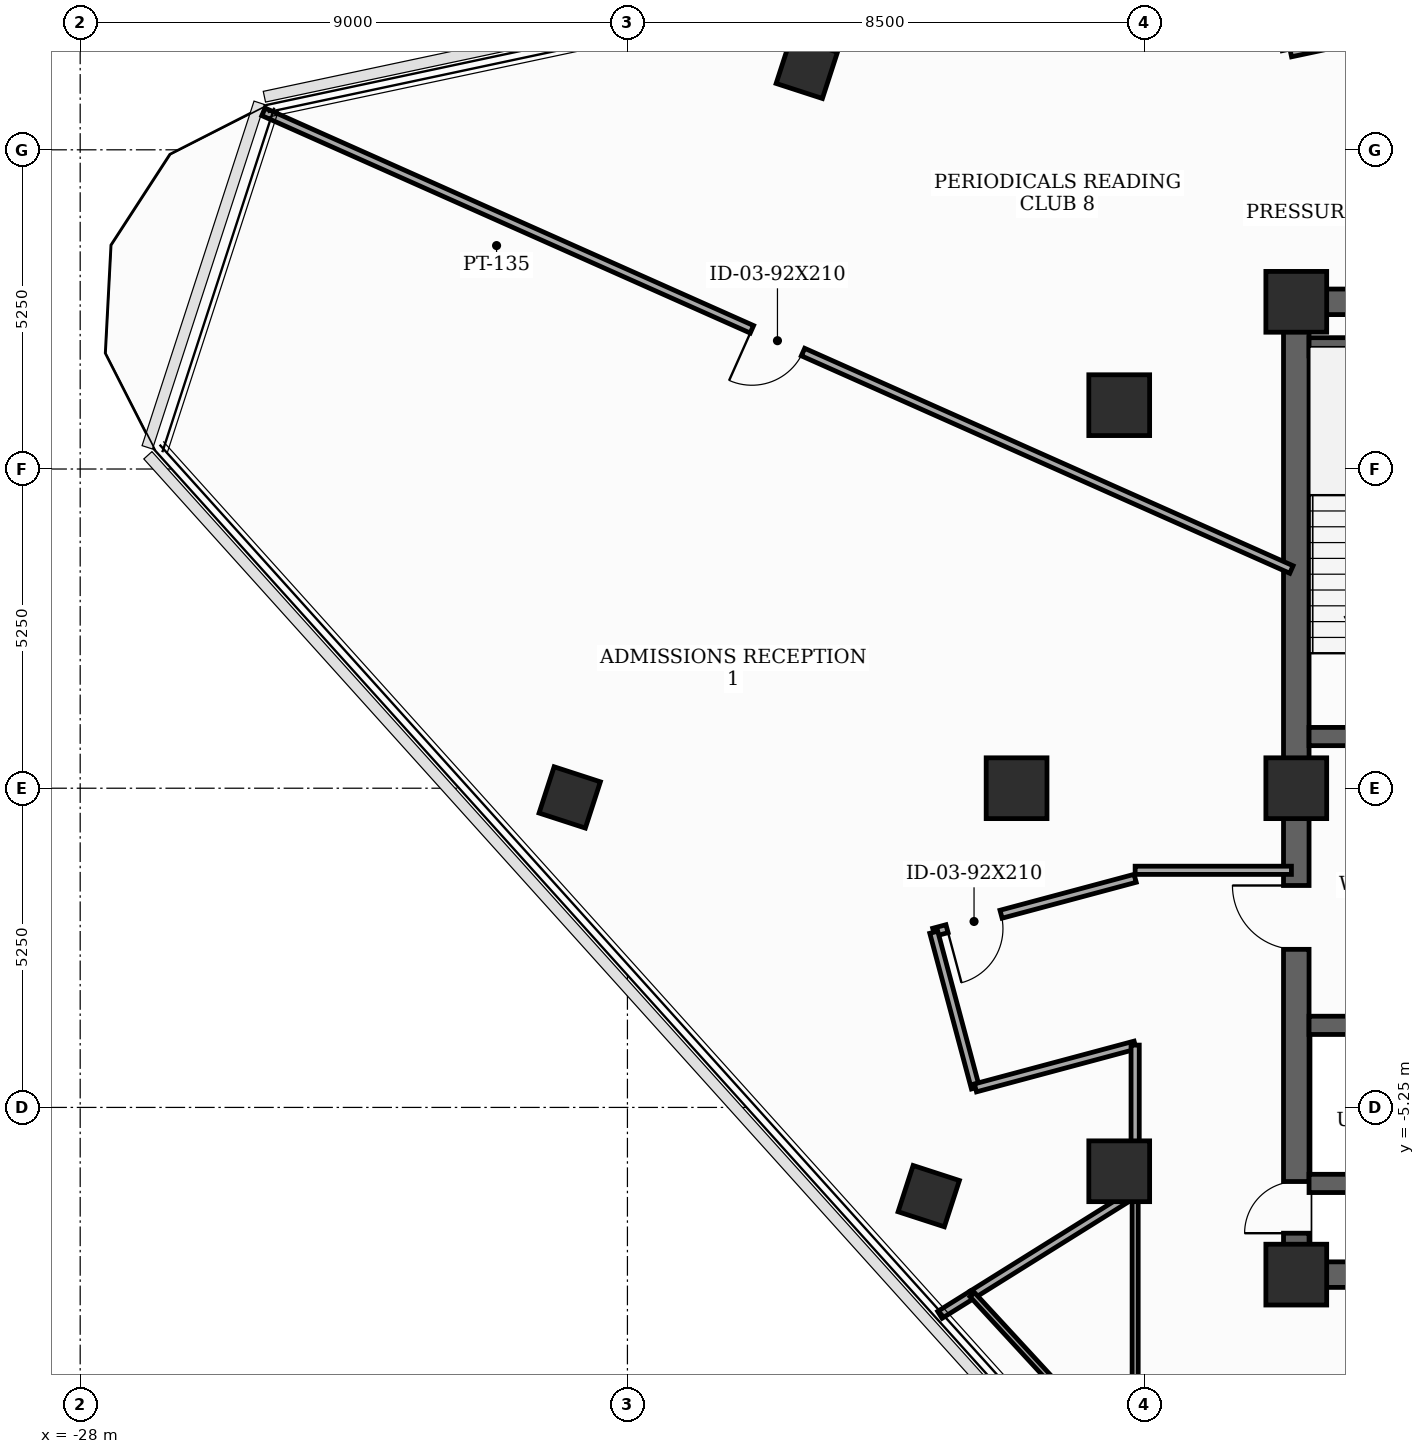
"""IFC4 building model, lengths in metres.
Left out: names, types, materials, properties, quantities, classifications, styles, units other than length and angle.
Written with IfcOpenShell. Run it as: python <this file> out.ifc"""

import sys

from ifc_helpers import new_model, si_unit, direction, frame, frame_2d, origin, origin_2d, place, context, subcontext, project, spatial, rectangle, extrude, element, fill, save


model = new_model("IFC4")
c1 = context("Model", 3, precision=1e-05, world=origin(), true_north=direction((0.0, 1.0)))
c2 = subcontext(c1, "Body", "Model", "MODEL_VIEW")
j1 = project(units=[si_unit("LENGTHUNIT", "METRE"), si_unit("PLANEANGLEUNIT", "RADIAN")], contexts=[c1])
p1 = place(None, origin())
s1 = spatial("IfcSite", under=j1, at=p1, CompositionType="ELEMENT")
p2 = place(p1, origin())
s2 = spatial("IfcBuilding", under=s1, at=p2, CompositionType="ELEMENT")
p3 = place(p2, frame((0.0, 0.0, 290.6)))
s3 = spatial("IfcBuildingStorey", under=s2, at=p3, CompositionType="ELEMENT", Elevation=290.6)
for number, where, z_axis, x_axis in (
    (1, (-8.0, -8.0, 0.0), (0.0, 0.0, 1.0), (1.0, 0.0, 0.0)),
    (2, (-8.0, 8.0, 0.0), (0.0, 0.0, 1.0), (1.0, 0.0, 0.0)),
    (3, (-8.0, 0.0, 0.0), (0.0, 0.0, 1.0), (1.0, 0.0, 0.0)),
    (4, (-10.912, 6.3, 0.0), (0.0, 0.0, 1.0), (1.0, 0.0, 0.0)),
    (5, (-12.6, 0.0, 0.0), (0.0, 0.0, 1.0), (1.0, 0.0, 0.0)),
    (6, (-10.912, -6.3, 0.0), (0.0, 0.0, 1.0), (1.0, 0.0, 0.0)),
):
    element("IfcColumn", number, at=place(p3, frame(where, z_axis=z_axis, x_axis=x_axis)), inside=s3, PredefinedType="COLUMN", context=c2, shape_type="SweptSolid", body=[
        extrude(rectangle(XDim=1.0, YDim=1.0, at=origin_2d()), origin(), (0.0, 0.0, 1.0), 3.7),
    ])
for number, where, z_axis, x_axis in (
    (7, (-16.05, 11.848, 0.0), (0.0, 0.0, 1.0), (0.309, 0.951, 0.0)),
    (8, (-19.949, -0.151, 0.0), (0.0, 0.0, 1.0), (0.309, 0.951, 0.0)),
    (9, (-14.045, -6.709, 0.0), (0.0, 0.0, 1.0), (0.309, 0.951, 0.0)),
):
    element("IfcColumn", number, at=place(p3, frame(where, z_axis=z_axis, x_axis=x_axis)), inside=s3, PredefinedType="COLUMN", context=c2, shape_type="SweptSolid", body=[
        extrude(rectangle(XDim=0.8, YDim=0.8, at=origin_2d()), origin(), (0.0, 0.0, 1.0), 3.7),
    ])
p4 = place(p3, frame((2.459, 14.402, 0.0), z_axis=(0.0, 0.0, 1.0), x_axis=(-0.978149082982, -0.207904717268, 0.0)))
e10 = element("IfcWall", 10, at=p4, inside=s3, PredefinedType="SOLIDWALL", context=c2, shape_type="SweptSolid", body=[
    extrude(rectangle(XDim=10.8, YDim=0.26, at=frame_2d((5.4, 0.0))), origin(), (0.0, 0.0, 1.0), 3.5),
])
p5 = place(p4, frame((4.6, 0.0, 0.0)))
e11 = element("IfcOpeningElement", 11, at=p5, cuts=e10, PredefinedType="OPENING", context=c2, shape_type="SweptSolid", body=[
    extrude(rectangle(XDim=1.05, YDim=2.08, at=frame_2d((0.525, 1.04))), frame((0.0, 0.14, 0.0), z_axis=(0.0, -1.0, 0.0), x_axis=(1.0, 0.0, 0.0)), (0.0, 0.0, 1.0), 0.28),
])
p6 = place(p4, frame((6.45, 0.0, 0.85)))
e12 = element("IfcOpeningElement", 12, at=p6, cuts=e10, PredefinedType="OPENING", context=c2, shape_type="SweptSolid", body=[
    extrude(rectangle(XDim=1.3, YDim=1.25, at=frame_2d((0.65, 0.625))), frame((0.0, 0.14, 0.0), z_axis=(0.0, -1.0, 0.0), x_axis=(1.0, 0.0, 0.0)), (0.0, 0.0, 1.0), 0.28),
])
p7 = place(p3, frame((-8.0, -8.0, 0.0), z_axis=(0.0, 0.0, 1.0), x_axis=(0.0, 1.0, 0.0)))
e13 = element("IfcWall", 13, at=p7, inside=s3, PredefinedType="SHEAR", context=c2, shape_type="SweptSolid", body=[
    extrude(rectangle(XDim=16.0, YDim=0.42, at=frame_2d((8.0, 0.0))), origin(), (0.0, 0.0, 1.0), 3.5),
])
p8 = place(p7, frame((0.681, 0.0, 0.0)))
e14 = element("IfcOpeningElement", 14, at=p8, cuts=e13, PredefinedType="OPENING", context=c2, shape_type="SweptSolid", body=[
    extrude(rectangle(XDim=0.85, YDim=2.02, at=frame_2d((0.425, 1.01))), frame((0.0, 0.22, 0.0), z_axis=(0.0, -1.0, 0.0), x_axis=(1.0, 0.0, 0.0)), (0.0, 0.0, 1.0), 0.44),
])
p9 = place(p7, frame((5.35, 0.0, 0.0)))
e15 = element("IfcOpeningElement", 15, at=p9, cuts=e13, PredefinedType="OPENING", context=c2, shape_type="SweptSolid", body=[
    extrude(rectangle(XDim=1.05, YDim=2.15, at=frame_2d((0.525, 1.075))), frame((0.0, 0.22, 0.0), z_axis=(0.0, -1.0, 0.0), x_axis=(1.0, 0.0, 0.0)), (0.0, 0.0, 1.0), 0.44),
])
p10 = place(p3, frame((-8.0, -8.0, 0.0), z_axis=(0.0, 0.0, 1.0), x_axis=(1.0, 0.0, 0.0)))
e16 = element("IfcWall", 16, at=p10, inside=s3, PredefinedType="SHEAR", context=c2, shape_type="SweptSolid", body=[
    extrude(rectangle(XDim=16.0, YDim=0.42, at=frame_2d((8.0, 0.0))), origin(), (0.0, 0.0, 1.0), 3.5),
])
p11 = place(p10, frame((5.2, 0.0, 0.0)))
e17 = element("IfcOpeningElement", 17, at=p11, cuts=e16, PredefinedType="OPENING", context=c2, shape_type="SweptSolid", body=[
    extrude(rectangle(XDim=0.95, YDim=2.1, at=frame_2d((0.475, 1.05))), frame((0.0, 0.22, 0.0), z_axis=(0.0, -1.0, 0.0), x_axis=(1.0, 0.0, 0.0)), (0.0, 0.0, 1.0), 0.44),
])
p12 = place(p10, frame((9.8, 0.0, 0.0)))
e18 = element("IfcOpeningElement", 18, at=p12, cuts=e16, PredefinedType="OPENING", context=c2, shape_type="SweptSolid", body=[
    extrude(rectangle(XDim=0.95, YDim=2.1, at=frame_2d((0.475, 1.05))), frame((0.0, 0.22, 0.0), z_axis=(0.0, -1.0, 0.0), x_axis=(1.0, 0.0, 0.0)), (0.0, 0.0, 1.0), 0.44),
])
p13 = place(p3, frame((-8.0, 8.0, 0.0), z_axis=(0.0, 0.0, 1.0), x_axis=(1.0, 0.0, 0.0)))
e19 = element("IfcWall", 19, at=p13, inside=s3, PredefinedType="SHEAR", context=c2, shape_type="SweptSolid", body=[
    extrude(rectangle(XDim=16.0, YDim=0.42, at=frame_2d((8.0, 0.0))), origin(), (0.0, 0.0, 1.0), 3.5),
])
p14 = place(p13, frame((7.1, 0.0, 0.0)))
e20 = element("IfcOpeningElement", 20, at=p14, cuts=e19, PredefinedType="OPENING", context=c2, shape_type="SweptSolid", body=[
    extrude(rectangle(XDim=1.8, YDim=2.15, at=frame_2d((0.9, 1.075))), frame((0.0, 0.22, 0.0), z_axis=(0.0, -1.0, 0.0), x_axis=(1.0, 0.0, 0.0)), (0.0, 0.0, 1.0), 0.44),
])
p15 = place(p3, frame((-7.79, 0.85, 0.0), z_axis=(0.0, 0.0, 1.0), x_axis=(1.0, 0.0, 0.0)))
e21 = element("IfcWall", 21, at=p15, inside=s3, PredefinedType="SHEAR", context=c2, shape_type="SweptSolid", body=[
    extrude(rectangle(XDim=3.34, YDim=0.3, at=frame_2d((1.67, 0.0))), origin(), (0.0, 0.0, 1.0), 3.5),
])
p16 = place(p15, frame((1.85, 0.0, 0.0)))
e22 = element("IfcOpeningElement", 22, at=p16, cuts=e21, PredefinedType="OPENING", context=c2, shape_type="SweptSolid", body=[
    extrude(rectangle(XDim=1.05, YDim=2.15, at=frame_2d((0.525, 1.075))), frame((0.0, 0.16, 0.0), z_axis=(0.0, -1.0, 0.0), x_axis=(1.0, 0.0, 0.0)), (0.0, 0.0, 1.0), 0.32),
])
p17 = place(p3, frame((-7.79, 7.26, 0.0), z_axis=(0.0, 0.0, 1.0), x_axis=(1.0, 0.0, 0.0)))
e23 = element("IfcWall", 23, at=p17, inside=s3, PredefinedType="SHEAR", context=c2, shape_type="SweptSolid", body=[
    extrude(rectangle(XDim=3.34, YDim=0.3, at=frame_2d((1.67, 0.0))), origin(), (0.0, 0.0, 1.0), 3.5),
])
p18 = place(p3, frame((-7.79, -3.9, 0.0), z_axis=(0.0, 0.0, 1.0), x_axis=(1.0, 0.0, 0.0)))
e24 = element("IfcWall", 24, at=p18, inside=s3, PredefinedType="SHEAR", context=c2, shape_type="SweptSolid", body=[
    extrude(rectangle(XDim=3.34, YDim=0.3, at=frame_2d((1.67, 0.0))), origin(), (0.0, 0.0, 1.0), 3.5),
])
p19 = place(p18, frame((1.27, 0.0, 0.0)))
e25 = element("IfcOpeningElement", 25, at=p19, cuts=e24, PredefinedType="OPENING", context=c2, shape_type="SweptSolid", body=[
    extrude(rectangle(XDim=1.1, YDim=2.1, at=frame_2d((0.55, 1.05))), frame((0.0, 0.16, 0.0), z_axis=(0.0, -1.0, 0.0), x_axis=(1.0, 0.0, 0.0)), (0.0, 0.0, 1.0), 0.32),
])
p20 = place(p3, frame((-7.79, -6.5, 0.0), z_axis=(0.0, 0.0, 1.0), x_axis=(1.0, 0.0, 0.0)))
e26 = element("IfcWall", 26, at=p20, inside=s3, PredefinedType="SHEAR", context=c2, shape_type="SweptSolid", body=[
    extrude(rectangle(XDim=3.34, YDim=0.3, at=frame_2d((1.67, 0.0))), origin(), (0.0, 0.0, 1.0), 3.5),
])
p21 = place(p3, frame((-8.08, -1.35, 0.0), z_axis=(0.0, 0.0, 1.0), x_axis=(-1.0, 0.0, 0.0)))
e27 = element("IfcWall", 27, at=p21, inside=s3, PredefinedType="PARTITIONING", context=c2, shape_type="SweptSolid", body=[
    extrude(rectangle(XDim=2.57, YDim=0.135, at=frame_2d((1.285, 0.0))), origin(), (0.0, 0.0, 1.0), 2.885),
])
p22 = place(p3, frame((-10.65, -1.482, 0.0), z_axis=(0.0, 0.0, 1.0), x_axis=(-0.965961397105, -0.2586862565, 0.0)))
e28 = element("IfcWall", 28, at=p22, inside=s3, PredefinedType="PARTITIONING", context=c2, shape_type="SweptSolid", body=[
    extrude(rectangle(XDim=3.429, YDim=0.135, at=frame_2d((1.714, 0.0))), origin(), (0.0, 0.0, 1.0), 2.885),
])
p23 = place(p22, frame((2.283, 0.0, 0.0)))
e29 = element("IfcOpeningElement", 29, at=p23, cuts=e28, PredefinedType="OPENING", context=c2, shape_type="SweptSolid", body=[
    extrude(rectangle(XDim=0.92, YDim=2.1, at=frame_2d((0.46, 1.05))), frame((0.0, 0.077, 0.0), z_axis=(0.0, -1.0, 0.0), x_axis=(1.0, 0.0, 0.0)), (0.0, 0.0, 1.0), 0.155),
])
p24 = place(p3, frame((-13.962, -2.369, 0.0), z_axis=(0.0, 0.0, 1.0), x_axis=(0.258413725385, -0.966034340245, 0.0)))
e30 = element("IfcWall", 30, at=p24, inside=s3, PredefinedType="PARTITIONING", context=c2, shape_type="SweptSolid", body=[
    extrude(rectangle(XDim=2.65, YDim=0.135, at=frame_2d((1.325, 0.0))), origin(), (0.0, 0.0, 1.0), 3.5),
])
p25 = place(p3, frame((-13.277, -4.929, 0.0), z_axis=(0.0, 0.0, 1.0), x_axis=(0.965934830229, 0.258785439601, 0.0)))
e31 = element("IfcWall", 31, at=p25, inside=s3, PredefinedType="PARTITIONING", context=c2, shape_type="SweptSolid", body=[
    extrude(rectangle(XDim=2.72, YDim=0.135, at=frame_2d((1.36, 0.0))), origin(), (0.0, 0.0, 1.0), 2.885),
])
p26 = place(p3, frame((-10.65, -4.225, 0.0), z_axis=(0.0, 0.0, 1.0), x_axis=(0.0, -1.0, 0.0)))
e32 = element("IfcWall", 32, at=p26, inside=s3, PredefinedType="PARTITIONING", context=c2, shape_type="SweptSolid", body=[
    extrude(rectangle(XDim=2.43, YDim=0.135, at=frame_2d((1.215, 0.0))), origin(), (0.0, 0.0, 1.0), 2.885),
])
p27 = place(p3, frame((-10.65, -6.655, 0.0), z_axis=(0.0, 0.0, 1.0), x_axis=(0.0, -1.0, 0.0)))
e33 = element("IfcWall", 33, at=p27, inside=s3, PredefinedType="MOVABLE", context=c2, shape_type="SweptSolid", body=[
    extrude(rectangle(XDim=3.495, YDim=0.1, at=frame_2d((1.748, 0.0))), origin(), (0.0, 0.0, 1.0), 2.885),
])
p28 = place(p3, frame((-13.329, -8.329, 0.0), z_axis=(0.0, 0.0, 1.0), x_axis=(0.848059079617, 0.529901686617, 0.0)))
e34 = element("IfcWall", 34, at=p28, inside=s3, PredefinedType="PARTITIONING", context=c2, shape_type="SweptSolid", body=[
    extrude(rectangle(XDim=3.159, YDim=0.135, at=frame_2d((1.58, 0.0))), origin(), (0.0, 0.0, 1.0), 2.885),
])
p29 = place(p3, frame((-13.861, -8.661, 0.0), z_axis=(0.0, 0.0, 1.0), x_axis=(0.848151340075, 0.529754003599, 0.0)))
e35 = element("IfcWall", 35, at=p29, inside=s3, PredefinedType="PARTITIONING", context=c2, shape_type="SweptSolid", body=[
    extrude(rectangle(XDim=0.627, YDim=0.135, at=frame_2d((0.313, 0.0))), origin(), (0.0, 0.0, 1.0), 3.5),
])
p30 = place(p3, frame((-8.08, 3.597, 0.0), z_axis=(0.0, 0.0, 1.0), x_axis=(-0.913542590258, 0.406743083266, 0.0)))
e36 = element("IfcWall", 36, at=p30, inside=s3, PredefinedType="PARTITIONING", context=c2, shape_type="SweptSolid", body=[
    extrude(rectangle(XDim=18.505, YDim=0.135, at=frame_2d((9.252, 0.0))), origin(), (0.0, 0.0, 1.0), 2.885),
])
p31 = place(p30, frame((8.792, 0.0, 0.0)))
e37 = element("IfcOpeningElement", 37, at=p31, cuts=e36, PredefinedType="OPENING", context=c2, shape_type="SweptSolid", body=[
    extrude(rectangle(XDim=0.92, YDim=2.1, at=frame_2d((0.46, 1.05))), frame((0.0, 0.077, 0.0), z_axis=(0.0, -1.0, 0.0), x_axis=(1.0, 0.0, 0.0)), (0.0, 0.0, 1.0), 0.155),
])
p32 = place(p3, frame((-13.329, -8.329, 0.0), z_axis=(0.0, 0.0, 1.0), x_axis=(0.677841155448, -0.735208384052, 0.0)))
e38 = element("IfcWall", 38, at=p32, inside=s3, PredefinedType="MOVABLE", context=c2, shape_type="SweptSolid", body=[
    extrude(rectangle(XDim=6.239, YDim=0.1, at=frame_2d((3.12, 0.0))), origin(), (0.0, 0.0, 1.0), 3.5),
])
p33 = place(p8, origin())
e39 = element("IfcDoor", 39, at=p33, inside=s3, OperationType="SINGLE_SWING_LEFT", PredefinedType="TRAPDOOR", context=c2, shape_type="SweptSolid", body=[
    extrude(rectangle(XDim=0.85, YDim=2.02, at=frame_2d((0.425, 1.01))), frame((0.0, 0.025, 0.0), z_axis=(0.0, -1.0, 0.0), x_axis=(1.0, 0.0, 0.0)), (0.0, 0.0, 1.0), 0.05),
])
fill(e14, e39)
p34 = place(p9, origin())
e40 = element("IfcDoor", 40, at=p34, inside=s3, OperationType="SINGLE_SWING_RIGHT", PredefinedType="DOOR", context=c2, shape_type="SweptSolid", body=[
    extrude(rectangle(XDim=1.05, YDim=2.15, at=frame_2d((0.525, 1.075))), frame((0.0, 0.025, 0.0), z_axis=(0.0, -1.0, 0.0), x_axis=(1.0, 0.0, 0.0)), (0.0, 0.0, 1.0), 0.05),
])
fill(e15, e40)
p35 = place(p23, origin())
e41 = element("IfcDoor", 41, at=p35, inside=s3, OperationType="SINGLE_SWING_RIGHT", PredefinedType="DOOR", context=c2, shape_type="SweptSolid", body=[
    extrude(rectangle(XDim=0.92, YDim=2.1, at=frame_2d((0.46, 1.05))), frame((0.0, 0.025, 0.0), z_axis=(0.0, -1.0, 0.0), x_axis=(1.0, 0.0, 0.0)), (0.0, 0.0, 1.0), 0.05),
])
fill(e29, e41)
p36 = place(p31, origin())
e42 = element("IfcDoor", 42, at=p36, inside=s3, OperationType="SINGLE_SWING_RIGHT", PredefinedType="DOOR", context=c2, shape_type="SweptSolid", body=[
    extrude(rectangle(XDim=0.92, YDim=2.1, at=frame_2d((0.46, 1.05))), frame((0.0, 0.025, 0.0), z_axis=(0.0, -1.0, 0.0), x_axis=(1.0, 0.0, 0.0)), (0.0, 0.0, 1.0), 0.05),
])
fill(e37, e42)
save(model, sys.argv[1])
